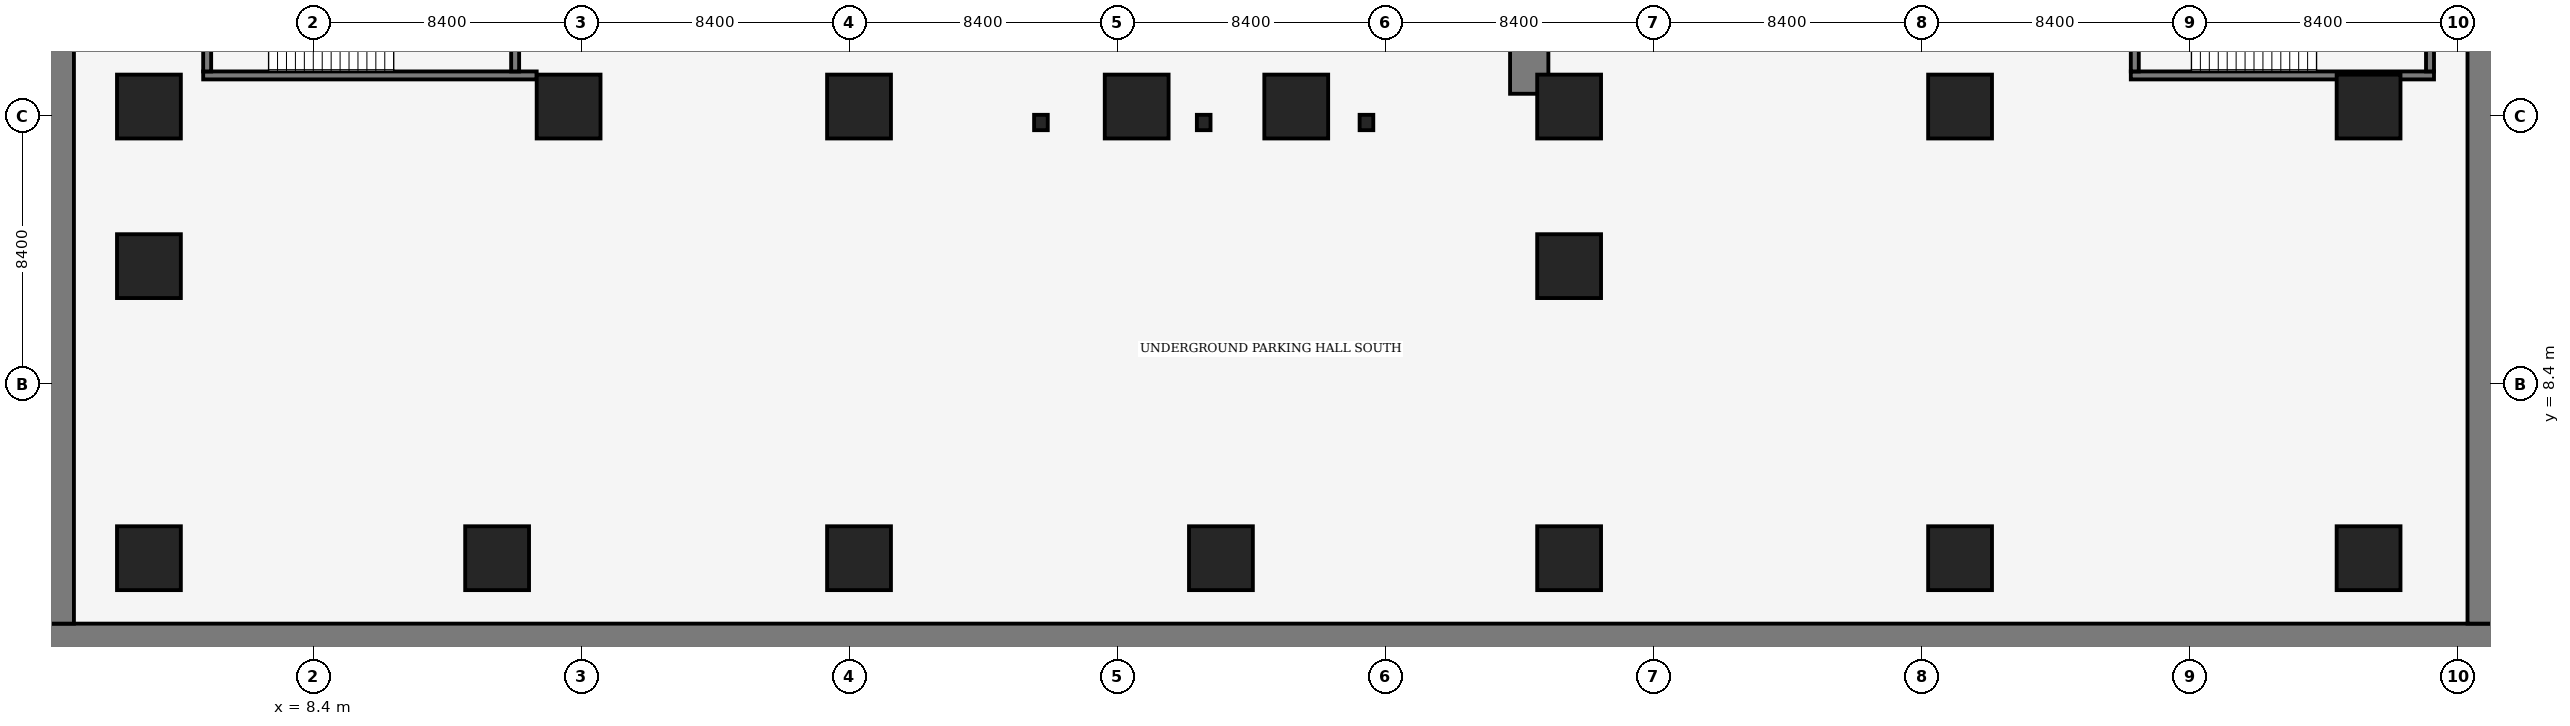
"""IFC4 building model, lengths in metres.
Left out: names, types, materials, properties, quantities, classifications, styles, units other than length and angle.
Written with IfcOpenShell. Run it as: python <this file> out.ifc"""

import sys

from ifc_helpers import new_model, si_unit, direction, frame, frame_2d, origin, origin_2d, place, context, subcontext, project, spatial, rectangle, i_section, extrude, source, transform, mapped, element, save


model = new_model("IFC4")
c1 = context("Model", 3, precision=1e-05, world=origin(), true_north=direction((0.0, 1.0)))
c2 = subcontext(c1, "Body", "Model", "MODEL_VIEW")
j1 = project(units=[si_unit("LENGTHUNIT", "METRE"), si_unit("PLANEANGLEUNIT", "RADIAN")], contexts=[c1])
p1 = place(None, origin())
s1 = spatial("IfcSite", under=j1, at=p1, CompositionType="ELEMENT")
p2 = place(p1, origin())
s2 = spatial("IfcBuilding", under=s1, at=p2, CompositionType="ELEMENT")
p3 = place(p2, frame((0.0, 0.0, -11.4)))
s3 = spatial("IfcBuildingStorey", under=s2, at=p3, CompositionType="ELEMENT", Elevation=-11.4)
m1 = source(origin(), c2, "Body", "SweptSolid", [
    extrude(rectangle(XDim=13.15, YDim=1.2, at=frame_2d((6.575, 0.0))), origin(), (0.0, 0.0, 1.0), 5.04),
])
p4 = place(p3, frame((46.5, 17.5, 0.0), z_axis=(0.0, 0.0, 1.0), x_axis=(0.0, 1.0, 0.0)))
e1 = element("IfcWall", 1, at=p4, inside=s3, PredefinedType="SHEAR", context=c2, shape_type="MappedRepresentation", body=[
    mapped(m1, transform((0.0, 0.0, 0.0), scale=1.0)),
])
m2 = source(origin(), c2, "Body", "SweptSolid", [
    extrude(rectangle(XDim=76.8, YDim=0.9, at=frame_2d((38.4, 0.0))), origin(), (0.0, 0.0, 1.0), 5.04),
])
p5 = place(p3, frame((0.0, 0.45, 0.0), z_axis=(0.0, 0.0, 1.0), x_axis=(1.0, 0.0, 0.0)))
e2 = element("IfcWall", 2, at=p5, inside=s3, PredefinedType="SOLIDWALL", context=c2, shape_type="MappedRepresentation", body=[
    mapped(m2, transform((0.0, 0.0, 0.0), scale=1.0)),
])
m3 = source(origin(), c2, "Body", "SweptSolid", [
    extrude(rectangle(XDim=48.6, YDim=0.9, at=frame_2d((24.3, 0.0))), origin(), (0.0, 0.0, 1.0), 5.04),
])
for number, where, z_axis, x_axis in (
    (3, (0.45, 0.9, 0.0), (0.0, 0.0, 1.0), (0.0, 1.0, 0.0)),
    (4, (76.35, 0.9, 0.0), (0.0, 0.0, 1.0), (0.0, 1.0, 0.0)),
):
    element("IfcWall", number, at=place(p3, frame(where, z_axis=z_axis, x_axis=x_axis)), inside=s3, PredefinedType="SOLIDWALL", context=c2, shape_type="MappedRepresentation", body=[
        mapped(m3, transform((0.0, 0.0, 0.0), scale=1.0)),
    ])
m4 = source(origin(), c2, "Body", "SweptSolid", [
    extrude(i_section(OverallWidth=0.428, OverallDepth=0.481, WebThickness=0.04, FlangeThickness=0.063, FilletRadius=0.015, at=origin_2d()), origin(), (0.0, 0.0, 1.0), 5.04),
])
for number, where, z_axis, x_axis in (
    (5, (31.2, 16.6, 0.0), (0.0, 0.0, 1.0), (1.0, 0.0, 0.0)),
    (6, (36.3, 16.6, 0.0), (0.0, 0.0, 1.0), (1.0, 0.0, 0.0)),
    (7, (41.4, 16.6, 0.0), (0.0, 0.0, 1.0), (1.0, 0.0, 0.0)),
):
    element("IfcColumn", number, at=place(p3, frame(where, z_axis=z_axis, x_axis=x_axis)), inside=s3, PredefinedType="COLUMN", context=c2, shape_type="MappedRepresentation", body=[
        mapped(m4, transform((0.0, 0.0, 0.0), scale=1.0)),
    ])
m5 = source(origin(), c2, "Body", "SweptSolid", [
    extrude(rectangle(XDim=2.0, YDim=2.0, at=origin_2d()), origin(), (0.0, 0.0, 1.0), 5.04),
])
for number, where, z_axis, x_axis in (
    (8, (3.25, 2.95, 0.0), (0.0, 0.0, 1.0), (1.0, 0.0, 0.0)),
    (9, (14.16, 2.95, 0.0), (0.0, 0.0, 1.0), (1.0, 0.0, 0.0)),
    (10, (25.5, 2.95, 0.0), (0.0, 0.0, 1.0), (1.0, 0.0, 0.0)),
    (11, (36.84, 2.95, 0.0), (0.0, 0.0, 1.0), (1.0, 0.0, 0.0)),
    (12, (47.75, 2.95, 0.0), (0.0, 0.0, 1.0), (1.0, 0.0, 0.0)),
    (13, (60.0, 2.95, 0.0), (0.0, 0.0, 1.0), (1.0, 0.0, 0.0)),
    (14, (72.8, 2.95, 0.0), (0.0, 0.0, 1.0), (1.0, 0.0, 0.0)),
    (15, (3.25, 12.1, 0.0), (0.0, 0.0, 1.0), (1.0, 0.0, 0.0)),
    (16, (47.75, 12.1, 0.0), (0.0, 0.0, 1.0), (1.0, 0.0, 0.0)),
    (17, (3.25, 17.1, 0.0), (0.0, 0.0, 1.0), (1.0, 0.0, 0.0)),
    (18, (16.4, 17.1, 0.0), (0.0, 0.0, 1.0), (1.0, 0.0, 0.0)),
    (19, (25.5, 17.1, 0.0), (0.0, 0.0, 1.0), (1.0, 0.0, 0.0)),
    (20, (34.2, 17.1, 0.0), (0.0, 0.0, 1.0), (1.0, 0.0, 0.0)),
    (21, (39.2, 17.1, 0.0), (0.0, 0.0, 1.0), (1.0, 0.0, 0.0)),
    (22, (47.75, 17.1, 0.0), (0.0, 0.0, 1.0), (1.0, 0.0, 0.0)),
    (23, (60.0, 17.1, 0.0), (0.0, 0.0, 1.0), (1.0, 0.0, 0.0)),
    (24, (72.8, 17.1, 0.0), (0.0, 0.0, 1.0), (1.0, 0.0, 0.0)),
):
    element("IfcColumn", number, at=place(p3, frame(where, z_axis=z_axis, x_axis=x_axis)), inside=s3, PredefinedType="COLUMN", context=c2, shape_type="MappedRepresentation", body=[
        mapped(m5, transform((0.0, 0.0, 0.0), scale=1.0)),
    ])
m6 = source(origin(), c2, "Body", "SweptSolid", [
    extrude(rectangle(XDim=10.45, YDim=0.25, at=frame_2d((5.225, 0.0))), origin(), (0.0, 0.0, 1.0), 5.2),
])
p6 = place(p3, frame((4.95, 18.075, 0.0), z_axis=(0.0, 0.0, 1.0), x_axis=(1.0, 0.0, 0.0)))
e25 = element("IfcWall", 25, at=p6, inside=s3, PredefinedType="SOLIDWALL", context=c2, shape_type="MappedRepresentation", body=[
    mapped(m6, transform((0.0, 0.0, 0.0), scale=1.0)),
])
m7 = source(origin(), c2, "Body", "SweptSolid", [
    extrude(rectangle(XDim=3.75, YDim=0.25, at=frame_2d((1.875, 0.0))), origin(), (0.0, 0.0, 1.0), 5.2),
])
p7 = place(p3, frame((14.725, 18.2, 0.0), z_axis=(0.0, 0.0, 1.0), x_axis=(0.0, 1.0, 0.0)))
e26 = element("IfcWall", 26, at=p7, inside=s3, PredefinedType="SOLIDWALL", context=c2, shape_type="MappedRepresentation", body=[
    mapped(m7, transform((0.0, 0.0, 0.0), scale=1.0)),
])
p8 = place(p3, frame((5.075, 18.2, 0.0), z_axis=(0.0, 0.0, 1.0), x_axis=(0.0, 1.0, 0.0)))
e27 = element("IfcWall", 27, at=p8, inside=s3, PredefinedType="SOLIDWALL", context=c2, shape_type="MappedRepresentation", body=[
    mapped(m7, transform((0.0, 0.0, 0.0), scale=1.0)),
])
m8 = source(origin(), c2, "Body", "SweptSolid", [
    extrude(rectangle(XDim=1.1, YDim=2.2, at=frame_2d((0.55, 1.1))), frame((0.0, 0.135, 0.0), z_axis=(0.0, -1.0, 0.0), x_axis=(1.0, 0.0, 0.0)), (0.0, 0.0, 1.0), 0.27),
])
p9 = place(p8, frame((2.3, 0.0, 0.0)))
e28 = element("IfcOpeningElement", 28, at=p9, cuts=e27, PredefinedType="OPENING", context=c2, shape_type="MappedRepresentation", body=[
    mapped(m8, transform((0.0, 0.0, 0.0), scale=1.0)),
])
m9 = source(origin(), c2, "Body", "SweptSolid", [
    extrude(rectangle(XDim=9.5, YDim=0.25, at=frame_2d((4.75, 0.0))), origin(), (0.0, 0.0, 1.0), 5.2),
])
p10 = place(p3, frame((65.35, 18.075, 0.0), z_axis=(0.0, 0.0, 1.0), x_axis=(1.0, 0.0, 0.0)))
e29 = element("IfcWall", 29, at=p10, inside=s3, PredefinedType="SOLIDWALL", context=c2, shape_type="MappedRepresentation", body=[
    mapped(m9, transform((0.0, 0.0, 0.0), scale=1.0)),
])
m10 = source(origin(), c2, "Body", "SweptSolid", [
    extrude(rectangle(XDim=3.45, YDim=0.25, at=frame_2d((1.725, 0.0))), origin(), (0.0, 0.0, 1.0), 5.2),
])
p11 = place(p3, frame((74.725, 18.2, 0.0), z_axis=(0.0, 0.0, 1.0), x_axis=(0.0, 1.0, 0.0)))
e30 = element("IfcWall", 30, at=p11, inside=s3, PredefinedType="SOLIDWALL", context=c2, shape_type="MappedRepresentation", body=[
    mapped(m10, transform((0.0, 0.0, 0.0), scale=1.0)),
])
p12 = place(p3, frame((65.475, 18.2, 0.0), z_axis=(0.0, 0.0, 1.0), x_axis=(0.0, 1.0, 0.0)))
e31 = element("IfcWall", 31, at=p12, inside=s3, PredefinedType="SOLIDWALL", context=c2, shape_type="MappedRepresentation", body=[
    mapped(m10, transform((0.0, 0.0, 0.0), scale=1.0)),
])
p13 = place(p12, frame((2.0, 0.0, 0.0)))
e32 = element("IfcOpeningElement", 32, at=p13, cuts=e31, PredefinedType="OPENING", context=c2, shape_type="MappedRepresentation", body=[
    mapped(m8, transform((0.0, 0.0, 0.0), scale=1.0)),
])
save(model, sys.argv[1])
